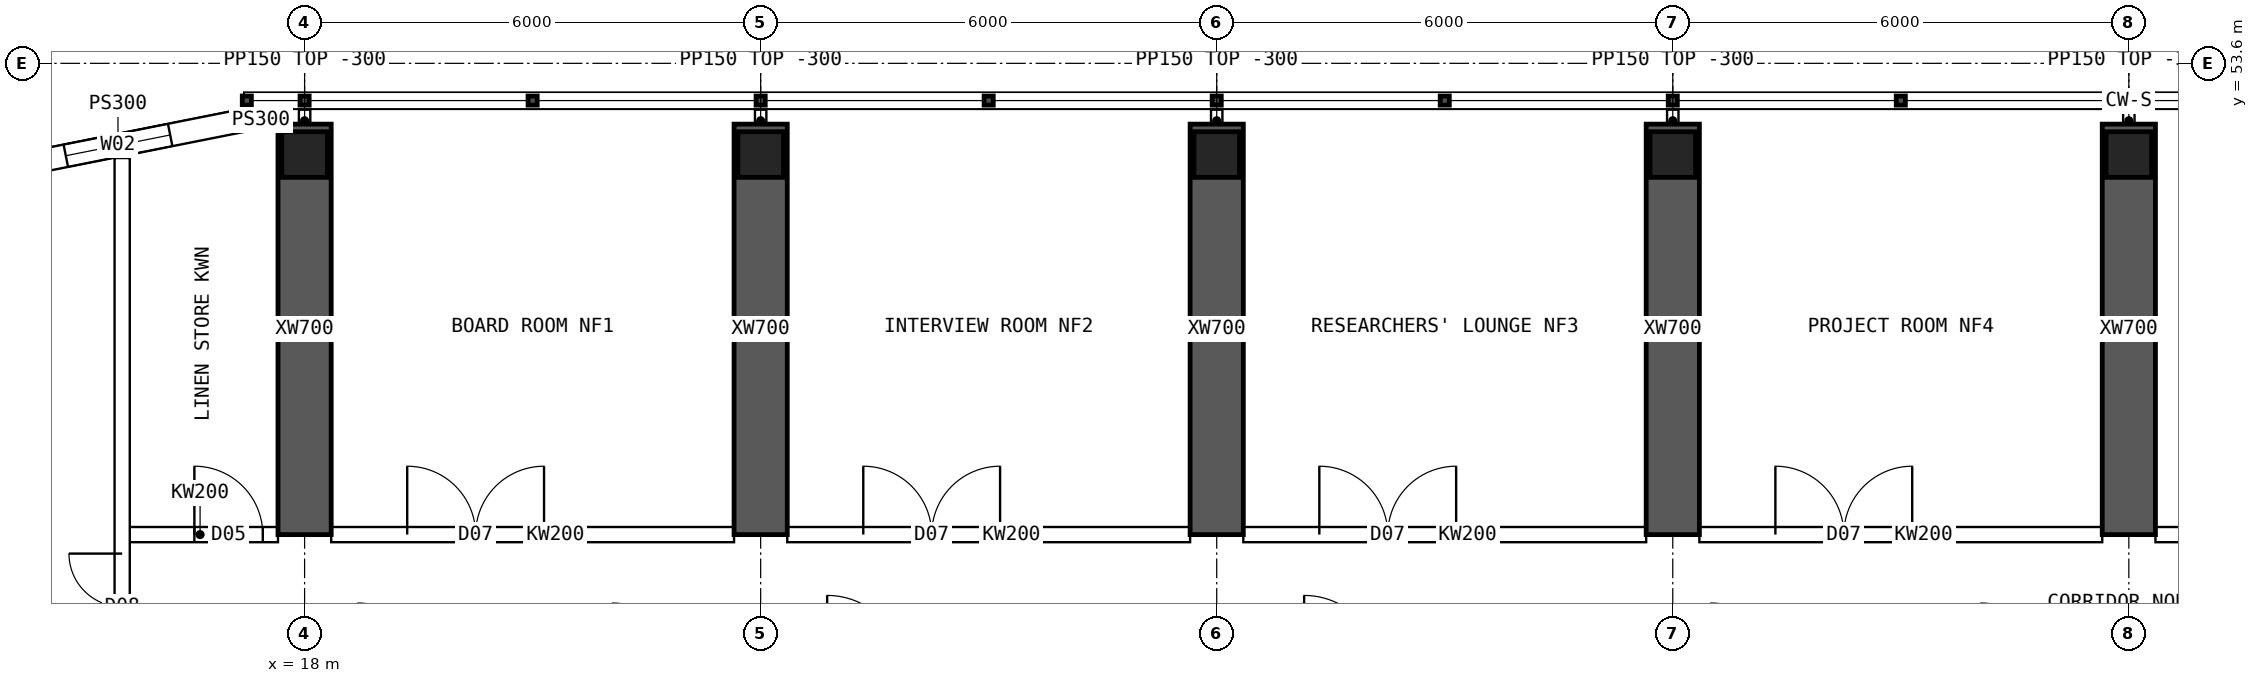
"""IFC4 building model, lengths in metres.
Left out: names, types, materials, properties, quantities, classifications, styles, units other than length and angle.
Written with IfcOpenShell. Run it as: python <this file> out.ifc"""

import sys

from ifc_helpers import new_model, si_unit, direction, frame, frame_2d, origin, origin_2d, place, context, subcontext, project, spatial, polyline, rectangle, hollow_rectangle, outline, extrude, element, fill, save


model = new_model("IFC4")
c1 = context("Model", 3, precision=1e-05, world=origin(), true_north=direction((0.0, 1.0)))
c2 = subcontext(c1, "Body", "Model", "MODEL_VIEW")
j1 = project(units=[si_unit("LENGTHUNIT", "METRE"), si_unit("PLANEANGLEUNIT", "RADIAN")], contexts=[c1])
p1 = place(None, origin())
s1 = spatial("IfcSite", under=j1, at=p1, CompositionType="ELEMENT")
p2 = place(p1, origin())
s2 = spatial("IfcBuilding", under=s1, at=p2, CompositionType="ELEMENT")
p3 = place(p2, frame((0.0, 0.0, 257.8)))
s3 = spatial("IfcBuildingStorey", under=s2, at=p3, CompositionType="ELEMENT", Elevation=257.8)
for number, where, z_axis, x_axis in (
    (1, (18.0, 52.4, 0.0), (0.0, 0.0, 1.0), (1.0, 0.0, 0.0)),
    (2, (24.0, 52.4, 0.0), (0.0, 0.0, 1.0), (1.0, 0.0, 0.0)),
    (3, (30.0, 52.4, 0.0), (0.0, 0.0, 1.0), (1.0, 0.0, 0.0)),
    (4, (36.0, 52.4, 0.0), (0.0, 0.0, 1.0), (1.0, 0.0, 0.0)),
    (5, (42.0, 52.4, 0.0), (0.0, 0.0, 1.0), (1.0, 0.0, 0.0)),
):
    element("IfcColumn", number, at=place(p3, frame(where, z_axis=z_axis, x_axis=x_axis)), inside=s3, PredefinedType="COLUMN", context=c2, shape_type="SweptSolid", body=[
        extrude(hollow_rectangle(XDim=0.6, YDim=0.6, WallThickness=0.06, at=origin_2d()), origin(), (0.0, 0.0, 1.0), 4.5),
    ])
for number, where, z_axis, x_axis in (
    (6, (18.0, 47.4, 0.0), (0.0, 0.0, 1.0), (0.0, 1.0, 0.0)),
    (7, (24.0, 47.4, 0.0), (0.0, 0.0, 1.0), (0.0, 1.0, 0.0)),
    (8, (30.0, 47.4, 0.0), (0.0, 0.0, 1.0), (0.0, 1.0, 0.0)),
    (9, (36.0, 47.4, 0.0), (0.0, 0.0, 1.0), (0.0, 1.0, 0.0)),
    (10, (42.0, 47.4, 0.0), (0.0, 0.0, 1.0), (0.0, 1.0, 0.0)),
):
    element("IfcWall", number, at=place(p3, frame(where, z_axis=z_axis, x_axis=x_axis)), inside=s3, PredefinedType="SHEAR", context=c2, shape_type="SweptSolid", body=[
        extrude(rectangle(XDim=5.4, YDim=0.7, at=frame_2d((2.7, 0.0))), origin(), (0.0, 0.0, 1.0), 4.5),
    ])
p4 = place(p3, frame((17.2, 52.85, 0.0), z_axis=(0.0, 0.0, 1.0), x_axis=(-0.98078325777, -0.195100490205, 0.0)))
e11 = element("IfcWall", 11, at=p4, inside=s3, PredefinedType="SOLIDWALL", context=c2, shape_type="SweptSolid", body=[
    extrude(outline(polyline([(-0.03, -0.15), (3.405, -0.15), (3.345, 0.15), (0.03, 0.15), (-0.03, -0.15)])), origin(), (0.0, 0.0, 1.0), 4.2),
])
p5 = place(p4, frame((0.988, 0.0, 0.9)))
e12 = element("IfcOpeningElement", 12, at=p5, cuts=e11, PredefinedType="OPENING", context=c2, shape_type="SweptSolid", body=[
    extrude(rectangle(XDim=1.4, YDim=1.8, at=frame_2d((0.7, 0.9))), frame((0.0, 0.16, 0.0), z_axis=(0.0, -1.0, 0.0), x_axis=(1.0, 0.0, 0.0)), (0.0, 0.0, 1.0), 0.32),
])
p6 = place(p3, frame((17.2, 52.85, 0.0), z_axis=(0.0, 0.0, 1.0), x_axis=(1.0, 0.0, 0.0)))
e13 = element("IfcWall", 13, at=p6, inside=s3, PredefinedType="SOLIDWALL", context=c2, shape_type="SweptSolid", body=[
    extrude(rectangle(XDim=0.45, YDim=0.3, at=frame_2d((0.225, 0.0))), origin(), (0.0, 0.0, 1.0), 4.2),
])
p7 = place(p3, frame((15.6, 47.4, 0.0), z_axis=(0.0, 0.0, 1.0), x_axis=(1.0, 0.0, 0.0)))
e14 = element("IfcWall", 14, at=p7, inside=s3, PredefinedType="SOLIDWALL", context=c2, shape_type="SweptSolid", body=[
    extrude(rectangle(XDim=2.05, YDim=0.2, at=frame_2d((1.025, 0.0))), origin(), (0.0, 0.0, 1.0), 4.2),
])
p8 = place(p7, frame((0.95, 0.0, 0.0)))
e15 = element("IfcOpeningElement", 15, at=p8, cuts=e14, PredefinedType="OPENING", context=c2, shape_type="SweptSolid", body=[
    extrude(rectangle(XDim=0.9, YDim=2.1, at=frame_2d((0.45, 1.05))), frame((0.0, 0.11, 0.0), z_axis=(0.0, -1.0, 0.0), x_axis=(1.0, 0.0, 0.0)), (0.0, 0.0, 1.0), 0.22),
])
p9 = place(p3, frame((18.35, 47.4, 0.0), z_axis=(0.0, 0.0, 1.0), x_axis=(1.0, 0.0, 0.0)))
e16 = element("IfcWall", 16, at=p9, inside=s3, PredefinedType="SOLIDWALL", context=c2, shape_type="SweptSolid", body=[
    extrude(rectangle(XDim=5.3, YDim=0.2, at=frame_2d((2.65, 0.0))), origin(), (0.0, 0.0, 1.0), 4.2),
])
p10 = place(p9, frame((1.0, 0.0, 0.0)))
e17 = element("IfcOpeningElement", 17, at=p10, cuts=e16, PredefinedType="OPENING", context=c2, shape_type="SweptSolid", body=[
    extrude(rectangle(XDim=1.8, YDim=2.1, at=frame_2d((0.9, 1.05))), frame((0.0, 0.11, 0.0), z_axis=(0.0, -1.0, 0.0), x_axis=(1.0, 0.0, 0.0)), (0.0, 0.0, 1.0), 0.22),
])
p11 = place(p3, frame((24.35, 47.4, 0.0), z_axis=(0.0, 0.0, 1.0), x_axis=(1.0, 0.0, 0.0)))
e18 = element("IfcWall", 18, at=p11, inside=s3, PredefinedType="SOLIDWALL", context=c2, shape_type="SweptSolid", body=[
    extrude(rectangle(XDim=5.3, YDim=0.2, at=frame_2d((2.65, 0.0))), origin(), (0.0, 0.0, 1.0), 4.2),
])
p12 = place(p11, frame((1.0, 0.0, 0.0)))
e19 = element("IfcOpeningElement", 19, at=p12, cuts=e18, PredefinedType="OPENING", context=c2, shape_type="SweptSolid", body=[
    extrude(rectangle(XDim=1.8, YDim=2.1, at=frame_2d((0.9, 1.05))), frame((0.0, 0.11, 0.0), z_axis=(0.0, -1.0, 0.0), x_axis=(1.0, 0.0, 0.0)), (0.0, 0.0, 1.0), 0.22),
])
p13 = place(p3, frame((30.35, 47.4, 0.0), z_axis=(0.0, 0.0, 1.0), x_axis=(1.0, 0.0, 0.0)))
e20 = element("IfcWall", 20, at=p13, inside=s3, PredefinedType="SOLIDWALL", context=c2, shape_type="SweptSolid", body=[
    extrude(rectangle(XDim=5.3, YDim=0.2, at=frame_2d((2.65, 0.0))), origin(), (0.0, 0.0, 1.0), 4.2),
])
p14 = place(p13, frame((1.0, 0.0, 0.0)))
e21 = element("IfcOpeningElement", 21, at=p14, cuts=e20, PredefinedType="OPENING", context=c2, shape_type="SweptSolid", body=[
    extrude(rectangle(XDim=1.8, YDim=2.1, at=frame_2d((0.9, 1.05))), frame((0.0, 0.11, 0.0), z_axis=(0.0, -1.0, 0.0), x_axis=(1.0, 0.0, 0.0)), (0.0, 0.0, 1.0), 0.22),
])
p15 = place(p3, frame((36.35, 47.4, 0.0), z_axis=(0.0, 0.0, 1.0), x_axis=(1.0, 0.0, 0.0)))
e22 = element("IfcWall", 22, at=p15, inside=s3, PredefinedType="SOLIDWALL", context=c2, shape_type="SweptSolid", body=[
    extrude(rectangle(XDim=5.3, YDim=0.2, at=frame_2d((2.65, 0.0))), origin(), (0.0, 0.0, 1.0), 4.2),
])
p16 = place(p15, frame((1.0, 0.0, 0.0)))
e23 = element("IfcOpeningElement", 23, at=p16, cuts=e22, PredefinedType="OPENING", context=c2, shape_type="SweptSolid", body=[
    extrude(rectangle(XDim=1.8, YDim=2.1, at=frame_2d((0.9, 1.05))), frame((0.0, 0.11, 0.0), z_axis=(0.0, -1.0, 0.0), x_axis=(1.0, 0.0, 0.0)), (0.0, 0.0, 1.0), 0.22),
])
p17 = place(p3, frame((42.35, 47.4, 0.0), z_axis=(0.0, 0.0, 1.0), x_axis=(1.0, 0.0, 0.0)))
e24 = element("IfcWall", 24, at=p17, inside=s3, PredefinedType="SOLIDWALL", context=c2, shape_type="SweptSolid", body=[
    extrude(rectangle(XDim=5.3, YDim=0.2, at=frame_2d((2.65, 0.0))), origin(), (0.0, 0.0, 1.0), 4.2),
])
p18 = place(p17, frame((1.0, 0.0, 0.0)))
e25 = element("IfcOpeningElement", 25, at=p18, cuts=e24, PredefinedType="OPENING", context=c2, shape_type="SweptSolid", body=[
    extrude(rectangle(XDim=1.8, YDim=2.1, at=frame_2d((0.9, 1.05))), frame((0.0, 0.11, 0.0), z_axis=(0.0, -1.0, 0.0), x_axis=(1.0, 0.0, 0.0)), (0.0, 0.0, 1.0), 0.22),
])
p19 = place(p3, frame((15.6, 11.646, 0.0), z_axis=(0.0, 0.0, 1.0), x_axis=(0.0, 1.0, 0.0)))
e26 = element("IfcWall", 26, at=p19, inside=s3, PredefinedType="SOLIDWALL", context=c2, shape_type="SweptSolid", body=[
    extrude(rectangle(XDim=40.708, YDim=0.2, at=frame_2d((20.354, 0.0))), origin(), (0.0, 0.0, 1.0), 4.2),
])
p20 = place(p19, frame((5.104, 0.0, 0.0)))
e27 = element("IfcOpeningElement", 27, at=p20, cuts=e26, PredefinedType="OPENING", context=c2, shape_type="SweptSolid", body=[
    extrude(rectangle(XDim=1.4, YDim=2.1, at=frame_2d((0.7, 1.05))), frame((0.0, 0.11, 0.0), z_axis=(0.0, -1.0, 0.0), x_axis=(1.0, 0.0, 0.0)), (0.0, 0.0, 1.0), 0.22),
])
p21 = place(p19, frame((34.104, 0.0, 0.0)))
e28 = element("IfcOpeningElement", 28, at=p21, cuts=e26, PredefinedType="OPENING", context=c2, shape_type="SweptSolid", body=[
    extrude(rectangle(XDim=1.4, YDim=2.1, at=frame_2d((0.7, 1.05))), frame((0.0, 0.11, 0.0), z_axis=(0.0, -1.0, 0.0), x_axis=(1.0, 0.0, 0.0)), (0.0, 0.0, 1.0), 0.22),
])
for number, where, z_axis, x_axis in (
    (29, (18.0, 52.7, 0.0), (0.0, 0.0, 1.0), (0.0, 1.0, 0.0)),
    (30, (24.0, 52.7, 0.0), (0.0, 0.0, 1.0), (0.0, 1.0, 0.0)),
    (31, (30.0, 52.7, 0.0), (0.0, 0.0, 1.0), (0.0, 1.0, 0.0)),
    (32, (36.0, 52.7, 0.0), (0.0, 0.0, 1.0), (0.0, 1.0, 0.0)),
    (33, (42.0, 52.7, 0.0), (0.0, 0.0, 1.0), (0.0, 1.0, 0.0)),
):
    element("IfcWall", number, at=place(p3, frame(where, z_axis=z_axis, x_axis=x_axis)), inside=s3, PredefinedType="PARTITIONING", context=c2, shape_type="SweptSolid", body=[
        extrude(rectangle(XDim=0.29, YDim=0.15, at=frame_2d((0.145, 0.0))), origin(), (0.0, 0.0, 1.0), 4.2),
    ])
p22 = place(p5, origin())
e34 = element("IfcWindow", 34, at=p22, inside=s3, PartitioningType="SINGLE_PANEL", PredefinedType="WINDOW", context=c2, shape_type="SweptSolid", body=[
    extrude(rectangle(XDim=1.4, YDim=1.8, at=frame_2d((0.7, 0.9))), frame((0.0, 0.03, 0.0), z_axis=(0.0, -1.0, 0.0), x_axis=(1.0, 0.0, 0.0)), (0.0, 0.0, 1.0), 0.06),
])
fill(e12, e34)
p23 = place(p10, origin())
e35 = element("IfcDoor", 35, at=p23, inside=s3, OperationType="DOUBLE_DOOR_SINGLE_SWING", PredefinedType="DOOR", context=c2, shape_type="SweptSolid", body=[
    extrude(rectangle(XDim=1.8, YDim=2.1, at=frame_2d((0.9, 1.05))), frame((0.0, 0.025, 0.0), z_axis=(0.0, -1.0, 0.0), x_axis=(1.0, 0.0, 0.0)), (0.0, 0.0, 1.0), 0.05),
])
fill(e17, e35)
p24 = place(p12, origin())
e36 = element("IfcDoor", 36, at=p24, inside=s3, OperationType="DOUBLE_DOOR_SINGLE_SWING", PredefinedType="DOOR", context=c2, shape_type="SweptSolid", body=[
    extrude(rectangle(XDim=1.8, YDim=2.1, at=frame_2d((0.9, 1.05))), frame((0.0, 0.025, 0.0), z_axis=(0.0, -1.0, 0.0), x_axis=(1.0, 0.0, 0.0)), (0.0, 0.0, 1.0), 0.05),
])
fill(e19, e36)
p25 = place(p14, origin())
e37 = element("IfcDoor", 37, at=p25, inside=s3, OperationType="DOUBLE_DOOR_SINGLE_SWING", PredefinedType="DOOR", context=c2, shape_type="SweptSolid", body=[
    extrude(rectangle(XDim=1.8, YDim=2.1, at=frame_2d((0.9, 1.05))), frame((0.0, 0.025, 0.0), z_axis=(0.0, -1.0, 0.0), x_axis=(1.0, 0.0, 0.0)), (0.0, 0.0, 1.0), 0.05),
])
fill(e21, e37)
p26 = place(p16, origin())
e38 = element("IfcDoor", 38, at=p26, inside=s3, OperationType="DOUBLE_DOOR_SINGLE_SWING", PredefinedType="DOOR", context=c2, shape_type="SweptSolid", body=[
    extrude(rectangle(XDim=1.8, YDim=2.1, at=frame_2d((0.9, 1.05))), frame((0.0, 0.025, 0.0), z_axis=(0.0, -1.0, 0.0), x_axis=(1.0, 0.0, 0.0)), (0.0, 0.0, 1.0), 0.05),
])
fill(e23, e38)
p27 = place(p21, origin())
e39 = element("IfcDoor", 39, at=p27, inside=s3, OperationType="DOUBLE_DOOR_SINGLE_SWING", PredefinedType="DOOR", context=c2, shape_type="SweptSolid", body=[
    extrude(rectangle(XDim=1.4, YDim=2.1, at=frame_2d((0.7, 1.05))), frame((0.0, 0.025, 0.0), z_axis=(0.0, -1.0, 0.0), x_axis=(1.0, 0.0, 0.0)), (0.0, 0.0, 1.0), 0.05),
])
fill(e28, e39)
p28 = place(p8, origin())
e40 = element("IfcDoor", 40, at=p28, inside=s3, OperationType="SINGLE_SWING_LEFT", PredefinedType="DOOR", context=c2, shape_type="SweptSolid", body=[
    extrude(rectangle(XDim=0.9, YDim=2.1, at=frame_2d((0.45, 1.05))), frame((0.0, 0.025, 0.0), z_axis=(0.0, -1.0, 0.0), x_axis=(1.0, 0.0, 0.0)), (0.0, 0.0, 1.0), 0.05),
])
fill(e15, e40)
save(model, sys.argv[1])
